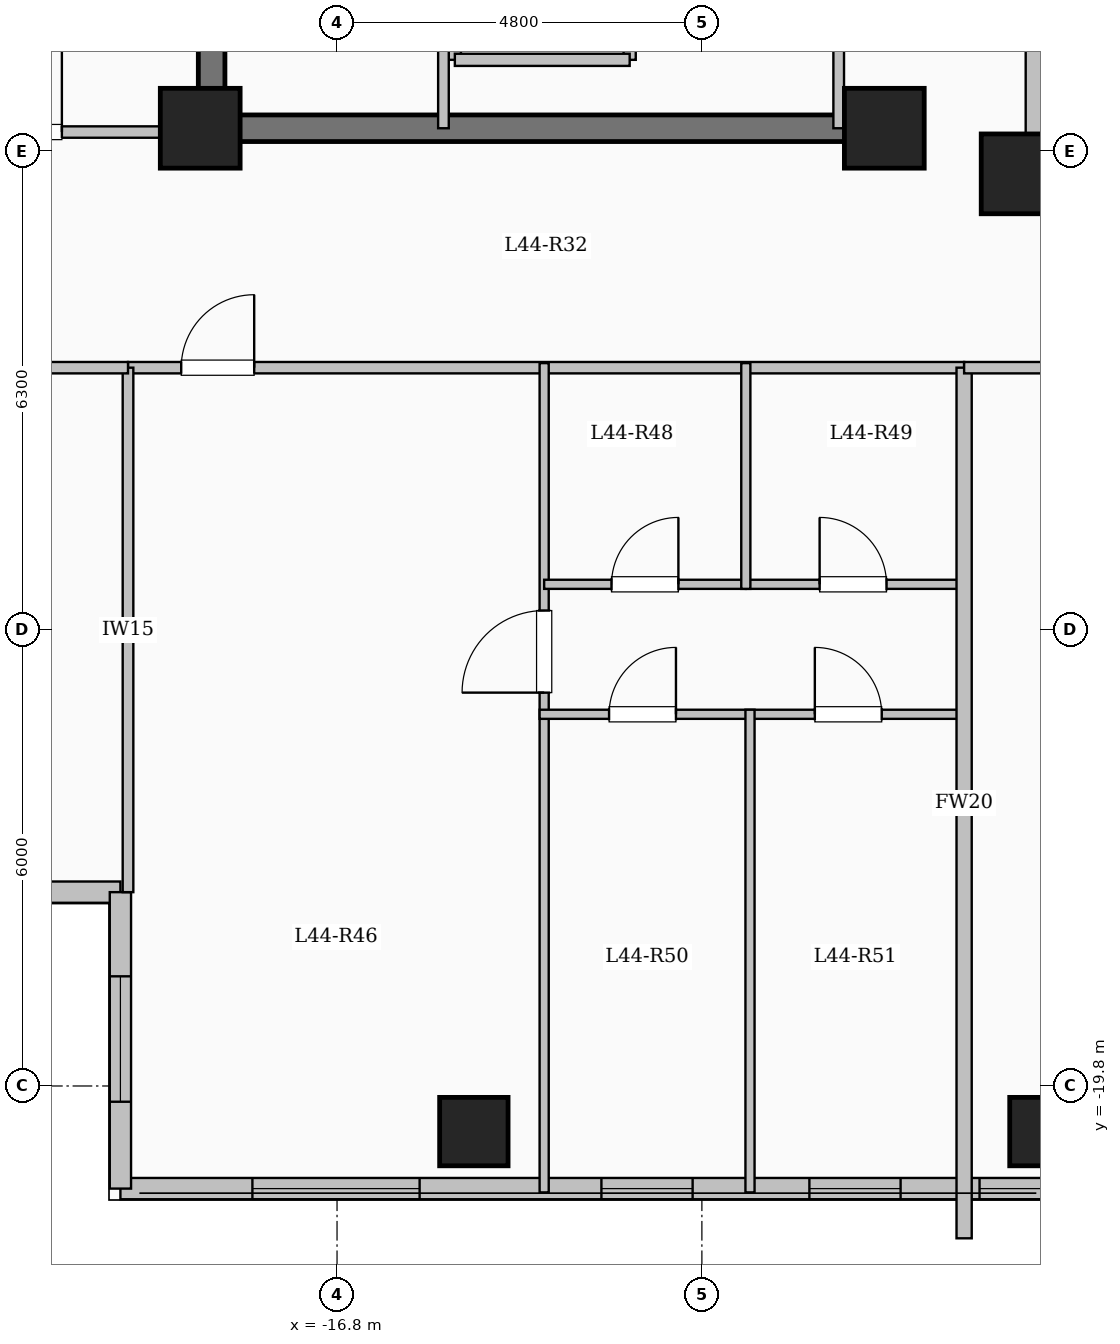
"""IFC4 building model, lengths in metres.
Left out: names, types, materials, properties, quantities, classifications, styles, units other than length and angle.
Written with IfcOpenShell. Run it as: python <this file> out.ifc"""

import sys

from ifc_helpers import new_model, si_unit, direction, frame, frame_2d, origin, origin_2d, place, context, subcontext, project, spatial, rectangle, extrude, element, fill, save


model = new_model("IFC4")
c1 = context("Model", 3, precision=1e-05, world=origin(), true_north=direction((0.0, 1.0)))
c2 = subcontext(c1, "Body", "Model", "MODEL_VIEW")
j1 = project(units=[si_unit("LENGTHUNIT", "METRE"), si_unit("PLANEANGLEUNIT", "RADIAN")], contexts=[c1])
p1 = place(None, origin())
s1 = spatial("IfcSite", under=j1, at=p1, CompositionType="ELEMENT")
p2 = place(p1, origin())
s2 = spatial("IfcBuilding", under=s1, at=p2, CompositionType="ELEMENT")
p3 = place(p2, frame((0.0, 0.0, 162.75)))
s3 = spatial("IfcBuildingStorey", under=s2, at=p3, CompositionType="ELEMENT", Elevation=162.75)
for number, where, z_axis, x_axis in (
    (1, (-7.8, -7.8, 0.0), (0.0, 0.0, 1.0), (1.0, 0.0, 0.0)),
    (2, (-9.6, -7.2, 0.0), (0.0, 0.0, 1.0), (1.0, 0.0, 0.0)),
    (3, (-18.6, -7.2, 0.0), (0.0, 0.0, 1.0), (1.0, 0.0, 0.0)),
):
    element("IfcColumn", number, at=place(p3, frame(where, z_axis=z_axis, x_axis=x_axis)), inside=s3, PredefinedType="COLUMN", context=c2, shape_type="SweptSolid", body=[
        extrude(rectangle(XDim=1.05, YDim=1.05, at=origin_2d()), origin(), (0.0, 0.0, 1.0), 3.35),
    ])
for number, where, z_axis, x_axis in (
    (4, (-15.0, -20.4, 0.0), (0.0, 0.0, 1.0), (1.0, 0.0, 0.0)),
    (5, (-7.5, -20.4, 0.0), (0.0, 0.0, 1.0), (1.0, 0.0, 0.0)),
):
    element("IfcColumn", number, at=place(p3, frame(where, z_axis=z_axis, x_axis=x_axis)), inside=s3, PredefinedType="COLUMN", context=c2, shape_type="SweptSolid", body=[
        extrude(rectangle(XDim=0.9, YDim=0.9, at=origin_2d()), origin(), (0.0, 0.0, 1.0), 3.35),
    ])
p4 = place(p3, frame((-7.62, -7.62, 0.0), z_axis=(0.0, 0.0, 1.0), x_axis=(1.0, 0.0, 0.0)))
e6 = element("IfcWall", 6, at=p4, inside=s3, PredefinedType="SOLIDWALL", context=c2, shape_type="SweptSolid", body=[
    extrude(rectangle(XDim=15.24, YDim=0.24, at=frame_2d((7.62, 0.0))), origin(), (0.0, 0.0, 1.0), 3.1),
])
p5 = place(p4, frame((6.92, 0.0, 0.95)))
e7 = element("IfcOpeningElement", 7, at=p5, cuts=e6, PredefinedType="OPENING", context=c2, shape_type="SweptSolid", body=[
    extrude(rectangle(XDim=1.4, YDim=1.5, at=frame_2d((0.7, 0.75))), frame((0.0, 0.13, 0.0), z_axis=(0.0, -1.0, 0.0), x_axis=(1.0, 0.0, 0.0)), (0.0, 0.0, 1.0), 0.26),
])
p6 = place(p3, frame((-7.62, 7.62, 0.0), z_axis=(0.0, 0.0, 1.0), x_axis=(0.0, -1.0, 0.0)))
e8 = element("IfcWall", 8, at=p6, inside=s3, PredefinedType="SOLIDWALL", context=c2, shape_type="SweptSolid", body=[
    extrude(rectangle(XDim=15.24, YDim=0.24, at=frame_2d((7.62, 0.0))), origin(), (0.0, 0.0, 1.0), 3.1),
])
p7 = place(p6, frame((6.92, 0.0, 0.95)))
e9 = element("IfcOpeningElement", 9, at=p7, cuts=e8, PredefinedType="OPENING", context=c2, shape_type="SweptSolid", body=[
    extrude(rectangle(XDim=1.4, YDim=1.5, at=frame_2d((0.7, 0.75))), frame((0.0, 0.13, 0.0), z_axis=(0.0, -1.0, 0.0), x_axis=(1.0, 0.0, 0.0)), (0.0, 0.0, 1.0), 0.26),
])
p8 = place(p3, frame((-19.65, -17.25, 0.0), z_axis=(0.0, 0.0, 1.0), x_axis=(-1.0, 0.0, 0.0)))
e10 = element("IfcWall", 10, at=p8, inside=s3, PredefinedType="SOLIDWALL", context=c2, shape_type="SweptSolid", body=[
    extrude(rectangle(XDim=5.4, YDim=0.28, at=frame_2d((2.7, 0.0))), origin(), (0.0, 0.0, 1.0), 3.1),
])
p9 = place(p8, frame((1.575, 0.0, 0.9)))
e11 = element("IfcOpeningElement", 11, at=p9, cuts=e10, PredefinedType="OPENING", context=c2, shape_type="SweptSolid", body=[
    extrude(rectangle(XDim=2.2, YDim=1.75, at=frame_2d((1.1, 0.875))), frame((0.0, 0.15, 0.0), z_axis=(0.0, -1.0, 0.0), x_axis=(1.0, 0.0, 0.0)), (0.0, 0.0, 1.0), 0.3),
])
p10 = place(p3, frame((-7.35, -21.15, 0.0), z_axis=(0.0, 0.0, 1.0), x_axis=(-1.0, 0.0, 0.0)))
e12 = element("IfcWall", 12, at=p10, inside=s3, PredefinedType="SOLIDWALL", context=c2, shape_type="SweptSolid", body=[
    extrude(rectangle(XDim=12.3, YDim=0.28, at=frame_2d((6.15, 0.0))), origin(), (0.0, 0.0, 1.0), 3.1),
])
p11 = place(p10, frame((0.147, 0.0, 0.95)))
e13 = element("IfcOpeningElement", 13, at=p11, cuts=e12, PredefinedType="OPENING", context=c2, shape_type="SweptSolid", body=[
    extrude(rectangle(XDim=0.85, YDim=1.5, at=frame_2d((0.425, 0.75))), frame((0.0, 0.15, 0.0), z_axis=(0.0, -1.0, 0.0), x_axis=(1.0, 0.0, 0.0)), (0.0, 0.0, 1.0), 0.3),
])
p12 = place(p10, frame((2.036, 0.0, 0.95)))
e14 = element("IfcOpeningElement", 14, at=p12, cuts=e12, PredefinedType="OPENING", context=c2, shape_type="SweptSolid", body=[
    extrude(rectangle(XDim=1.2, YDim=1.5, at=frame_2d((0.6, 0.75))), frame((0.0, 0.15, 0.0), z_axis=(0.0, -1.0, 0.0), x_axis=(1.0, 0.0, 0.0)), (0.0, 0.0, 1.0), 0.3),
])
p13 = place(p10, frame((4.772, 0.0, 0.95)))
e15 = element("IfcOpeningElement", 15, at=p13, cuts=e12, PredefinedType="OPENING", context=c2, shape_type="SweptSolid", body=[
    extrude(rectangle(XDim=1.2, YDim=1.5, at=frame_2d((0.6, 0.75))), frame((0.0, 0.15, 0.0), z_axis=(0.0, -1.0, 0.0), x_axis=(1.0, 0.0, 0.0)), (0.0, 0.0, 1.0), 0.3),
])
p14 = place(p10, frame((8.364, 0.0, 0.9)))
e16 = element("IfcOpeningElement", 16, at=p14, cuts=e12, PredefinedType="OPENING", context=c2, shape_type="SweptSolid", body=[
    extrude(rectangle(XDim=2.2, YDim=1.75, at=frame_2d((1.1, 0.875))), frame((0.0, 0.15, 0.0), z_axis=(0.0, -1.0, 0.0), x_axis=(1.0, 0.0, 0.0)), (0.0, 0.0, 1.0), 0.3),
])
p15 = place(p3, frame((-19.65, -21.15, 0.0), z_axis=(0.0, 0.0, 1.0), x_axis=(0.0, 1.0, 0.0)))
e17 = element("IfcWall", 17, at=p15, inside=s3, PredefinedType="SOLIDWALL", context=c2, shape_type="SweptSolid", body=[
    extrude(rectangle(XDim=3.9, YDim=0.28, at=frame_2d((1.95, 0.0))), origin(), (0.0, 0.0, 1.0), 3.1),
])
p16 = place(p15, frame((1.143, 0.0, 0.9)))
e18 = element("IfcOpeningElement", 18, at=p16, cuts=e17, PredefinedType="OPENING", context=c2, shape_type="SweptSolid", body=[
    extrude(rectangle(XDim=1.65, YDim=1.6, at=frame_2d((0.825, 0.8))), frame((0.0, 0.15, 0.0), z_axis=(0.0, -1.0, 0.0), x_axis=(1.0, 0.0, 0.0)), (0.0, 0.0, 1.0), 0.3),
])
for number, where, z_axis, x_axis in (
    (19, (-15.25, -6.3, 0.0), (0.0, 0.0, 1.0), (0.0, 1.0, 0.0)),
    (20, (-12.95, -6.3, 0.0), (0.0, 0.0, 1.0), (0.0, 1.0, 0.0)),
):
    element("IfcWall", number, at=place(p3, frame(where, z_axis=z_axis, x_axis=x_axis)), inside=s3, PredefinedType="SOLIDWALL", context=c2, shape_type="SweptSolid", body=[
        extrude(rectangle(XDim=2.6, YDim=0.16, at=frame_2d((1.3, 0.0))), origin(), (0.0, 0.0, 1.0), 3.1),
    ])
p17 = place(p3, frame((-15.25, -6.3, 0.0), z_axis=(0.0, 0.0, 1.0), x_axis=(1.0, 0.0, 0.0)))
e21 = element("IfcWall", 21, at=p17, inside=s3, PredefinedType="SOLIDWALL", context=c2, shape_type="SweptSolid", body=[
    extrude(rectangle(XDim=2.3, YDim=0.16, at=frame_2d((1.15, 0.0))), origin(), (0.0, 0.0, 1.0), 3.1),
])
p18 = place(p3, frame((-18.45, -7.375, 0.0), z_axis=(0.0, 0.0, 1.0), x_axis=(0.0, 1.0, 0.0)))
e22 = element("IfcWall", 22, at=p18, inside=s3, PredefinedType="SHEAR", context=c2, shape_type="SweptSolid", body=[
    extrude(rectangle(XDim=14.05, YDim=0.35, at=frame_2d((7.025, 0.0))), origin(), (0.0, 0.0, 1.0), 3.35),
])
p19 = place(p3, frame((-18.625, -7.2, 0.0), z_axis=(0.0, 0.0, 1.0), x_axis=(1.0, 0.0, 0.0)))
e23 = element("IfcWall", 23, at=p19, inside=s3, PredefinedType="SHEAR", context=c2, shape_type="SweptSolid", body=[
    extrude(rectangle(XDim=8.55, YDim=0.35, at=frame_2d((4.275, 0.0))), origin(), (0.0, 0.0, 1.0), 3.35),
])
p20 = place(p3, frame((-15.4, -7.2, 0.0), z_axis=(0.0, 0.0, 1.0), x_axis=(0.0, 1.0, 0.0)))
e24 = element("IfcWall", 24, at=p20, inside=s3, PredefinedType="PARTITIONING", context=c2, shape_type="SweptSolid", body=[
    extrude(rectangle(XDim=10.45, YDim=0.14, at=frame_2d((5.225, 0.0))), origin(), (0.0, 0.0, 1.0), 3.1),
])
p21 = place(p20, frame((9.25, 0.0, 0.0)))
e25 = element("IfcOpeningElement", 25, at=p21, cuts=e24, PredefinedType="OPENING", context=c2, shape_type="SweptSolid", body=[
    extrude(rectangle(XDim=0.9, YDim=2.08, at=frame_2d((0.45, 1.04))), frame((0.0, 0.08, 0.0), z_axis=(0.0, -1.0, 0.0), x_axis=(1.0, 0.0, 0.0)), (0.0, 0.0, 1.0), 0.16),
])
p22 = place(p3, frame((-10.2, -7.2, 0.0), z_axis=(0.0, 0.0, 1.0), x_axis=(0.0, 1.0, 0.0)))
e26 = element("IfcWall", 26, at=p22, inside=s3, PredefinedType="PARTITIONING", context=c2, shape_type="SweptSolid", body=[
    extrude(rectangle(XDim=9.12, YDim=0.14, at=frame_2d((4.56, 0.0))), origin(), (0.0, 0.0, 1.0), 3.1),
])
p23 = place(p22, frame((1.9, 0.0, 0.0)))
e27 = element("IfcOpeningElement", 27, at=p23, cuts=e26, PredefinedType="OPENING", context=c2, shape_type="SweptSolid", body=[
    extrude(rectangle(XDim=0.95, YDim=2.12, at=frame_2d((0.475, 1.06))), frame((0.0, 0.08, 0.0), z_axis=(0.0, -1.0, 0.0), x_axis=(1.0, 0.0, 0.0)), (0.0, 0.0, 1.0), 0.16),
])
p24 = place(p22, frame((7.75, 0.0, 0.0)))
e28 = element("IfcOpeningElement", 28, at=p24, cuts=e26, PredefinedType="OPENING", context=c2, shape_type="SweptSolid", body=[
    extrude(rectangle(XDim=0.95, YDim=2.12, at=frame_2d((0.475, 1.06))), frame((0.0, 0.08, 0.0), z_axis=(0.0, -1.0, 0.0), x_axis=(1.0, 0.0, 0.0)), (0.0, 0.0, 1.0), 0.16),
])
p25 = place(p3, frame((-19.55, -10.35, 0.0), z_axis=(0.0, 0.0, 1.0), x_axis=(1.0, 0.0, 0.0)))
e29 = element("IfcWall", 29, at=p25, inside=s3, PredefinedType="PARTITIONING", context=c2, shape_type="SweptSolid", body=[
    extrude(rectangle(XDim=11.0, YDim=0.15, at=frame_2d((5.5, 0.0))), origin(), (0.0, 0.0, 1.0), 3.1),
])
p26 = place(p25, frame((0.7, 0.0, 0.0)))
e30 = element("IfcOpeningElement", 30, at=p26, cuts=e29, PredefinedType="OPENING", context=c2, shape_type="SweptSolid", body=[
    extrude(rectangle(XDim=0.96, YDim=2.15, at=frame_2d((0.48, 1.075))), frame((0.0, 0.085, 0.0), z_axis=(0.0, -1.0, 0.0), x_axis=(1.0, 0.0, 0.0)), (0.0, 0.0, 1.0), 0.17),
])
p27 = place(p3, frame((-14.075, -21.2, 0.0), z_axis=(0.0, 0.0, 1.0), x_axis=(0.0, 1.0, 0.0)))
e31 = element("IfcWall", 31, at=p27, inside=s3, PredefinedType="PARTITIONING", context=c2, shape_type="SweptSolid", body=[
    extrude(rectangle(XDim=10.91, YDim=0.12, at=frame_2d((5.455, 0.0))), origin(), (0.0, 0.0, 1.0), 3.1),
])
p28 = place(p27, frame((6.575, 0.0, 0.0)))
e32 = element("IfcOpeningElement", 32, at=p28, cuts=e31, PredefinedType="OPENING", context=c2, shape_type="SweptSolid", body=[
    extrude(rectangle(XDim=1.08, YDim=2.15, at=frame_2d((0.54, 1.075))), frame((0.0, 0.07, 0.0), z_axis=(0.0, -1.0, 0.0), x_axis=(1.0, 0.0, 0.0)), (0.0, 0.0, 1.0), 0.14),
])
p29 = place(p3, frame((-14.075, -13.2, 0.0), z_axis=(0.0, 0.0, 1.0), x_axis=(1.0, 0.0, 0.0)))
e33 = element("IfcWall", 33, at=p29, inside=s3, PredefinedType="PARTITIONING", context=c2, shape_type="SweptSolid", body=[
    extrude(rectangle(XDim=2.653, YDim=0.12, at=frame_2d((1.326, 0.0))), origin(), (0.0, 0.0, 1.0), 3.1),
])
p30 = place(p29, frame((0.886, 0.0, 0.0)))
e34 = element("IfcOpeningElement", 34, at=p30, cuts=e33, PredefinedType="OPENING", context=c2, shape_type="SweptSolid", body=[
    extrude(rectangle(XDim=0.88, YDim=2.1, at=frame_2d((0.44, 1.05))), frame((0.0, 0.07, 0.0), z_axis=(0.0, -1.0, 0.0), x_axis=(1.0, 0.0, 0.0)), (0.0, 0.0, 1.0), 0.14),
])
p31 = place(p3, frame((-11.422, -13.2, 0.0), z_axis=(0.0, 0.0, 1.0), x_axis=(1.0, 0.0, 0.0)))
e35 = element("IfcWall", 35, at=p31, inside=s3, PredefinedType="PARTITIONING", context=c2, shape_type="SweptSolid", body=[
    extrude(rectangle(XDim=2.822, YDim=0.12, at=frame_2d((1.411, 0.0))), origin(), (0.0, 0.0, 1.0), 3.1),
])
p32 = place(p31, frame((0.971, 0.0, 0.0)))
e36 = element("IfcOpeningElement", 36, at=p32, cuts=e35, PredefinedType="OPENING", context=c2, shape_type="SweptSolid", body=[
    extrude(rectangle(XDim=0.88, YDim=2.1, at=frame_2d((0.44, 1.05))), frame((0.0, 0.07, 0.0), z_axis=(0.0, -1.0, 0.0), x_axis=(1.0, 0.0, 0.0)), (0.0, 0.0, 1.0), 0.14),
])
p33 = place(p3, frame((-14.135, -14.91, 0.0), z_axis=(0.0, 0.0, 1.0), x_axis=(1.0, 0.0, 0.0)))
e37 = element("IfcWall", 37, at=p33, inside=s3, PredefinedType="PARTITIONING", context=c2, shape_type="SweptSolid", body=[
    extrude(rectangle(XDim=5.595, YDim=0.12, at=frame_2d((2.797, 0.0))), origin(), (0.0, 0.0, 1.0), 3.1),
])
p34 = place(p33, frame((0.914, 0.0, 0.0)))
e38 = element("IfcOpeningElement", 38, at=p34, cuts=e37, PredefinedType="OPENING", context=c2, shape_type="SweptSolid", body=[
    extrude(rectangle(XDim=0.88, YDim=2.1, at=frame_2d((0.44, 1.05))), frame((0.0, 0.07, 0.0), z_axis=(0.0, -1.0, 0.0), x_axis=(1.0, 0.0, 0.0)), (0.0, 0.0, 1.0), 0.14),
])
p35 = place(p33, frame((3.621, 0.0, 0.0)))
e39 = element("IfcOpeningElement", 39, at=p35, cuts=e37, PredefinedType="OPENING", context=c2, shape_type="SweptSolid", body=[
    extrude(rectangle(XDim=0.88, YDim=2.1, at=frame_2d((0.44, 1.05))), frame((0.0, 0.07, 0.0), z_axis=(0.0, -1.0, 0.0), x_axis=(1.0, 0.0, 0.0)), (0.0, 0.0, 1.0), 0.14),
])
p36 = place(p3, frame((-11.422, -13.26, 0.0), z_axis=(0.0, 0.0, 1.0), x_axis=(0.0, 1.0, 0.0)))
e40 = element("IfcWall", 40, at=p36, inside=s3, PredefinedType="PARTITIONING", context=c2, shape_type="SweptSolid", body=[
    extrude(rectangle(XDim=2.97, YDim=0.12, at=frame_2d((1.485, 0.0))), origin(), (0.0, 0.0, 1.0), 3.1),
])
p37 = place(p3, frame((-11.367, -21.2, 0.0), z_axis=(0.0, 0.0, 1.0), x_axis=(0.0, 1.0, 0.0)))
e41 = element("IfcWall", 41, at=p37, inside=s3, PredefinedType="PARTITIONING", context=c2, shape_type="SweptSolid", body=[
    extrude(rectangle(XDim=6.35, YDim=0.12, at=frame_2d((3.175, 0.0))), origin(), (0.0, 0.0, 1.0), 3.1),
])
p38 = place(p3, frame((-8.55, -21.804, 0.0), z_axis=(0.0, 0.0, 1.0), x_axis=(0.0, 1.0, 0.0)))
e42 = element("IfcWall", 42, at=p38, inside=s3, PredefinedType="SOLIDWALL", context=c2, shape_type="SweptSolid", body=[
    extrude(rectangle(XDim=11.454, YDim=0.2, at=frame_2d((5.727, 0.0))), origin(), (0.0, 0.0, 1.0), 3.1),
])
p39 = place(p3, frame((-8.55, -10.35, 0.0), z_axis=(0.0, 0.0, 1.0), x_axis=(1.0, 0.0, 0.0)))
e43 = element("IfcWall", 43, at=p39, inside=s3, PredefinedType="PARTITIONING", context=c2, shape_type="SweptSolid", body=[
    extrude(rectangle(XDim=17.1, YDim=0.15, at=frame_2d((8.55, 0.0))), origin(), (0.0, 0.0, 1.0), 3.1),
])
p40 = place(p39, frame((1.6, 0.0, 0.0)))
e44 = element("IfcOpeningElement", 44, at=p40, cuts=e43, PredefinedType="OPENING", context=c2, shape_type="SweptSolid", body=[
    extrude(rectangle(XDim=0.96, YDim=2.15, at=frame_2d((0.48, 1.075))), frame((0.0, 0.085, 0.0), z_axis=(0.0, -1.0, 0.0), x_axis=(1.0, 0.0, 0.0)), (0.0, 0.0, 1.0), 0.17),
])
p41 = place(p3, frame((-25.08, -7.25, 0.0), z_axis=(0.0, 0.0, 1.0), x_axis=(1.0, 0.0, 0.0)))
e45 = element("IfcWall", 45, at=p41, inside=s3, PredefinedType="PARTITIONING", context=c2, shape_type="SweptSolid", body=[
    extrude(rectangle(XDim=6.63, YDim=0.15, at=frame_2d((3.315, 0.0))), origin(), (0.0, 0.0, 1.0), 3.1),
])
p42 = place(p41, frame((3.58, 0.0, 0.0)))
e46 = element("IfcOpeningElement", 46, at=p42, cuts=e45, PredefinedType="OPENING", context=c2, shape_type="SweptSolid", body=[
    extrude(rectangle(XDim=1.08, YDim=2.15, at=frame_2d((0.54, 1.075))), frame((0.0, 0.085, 0.0), z_axis=(0.0, -1.0, 0.0), x_axis=(1.0, 0.0, 0.0)), (0.0, 0.0, 1.0), 0.17),
])
p43 = place(p3, frame((-19.55, -17.25, 0.0), z_axis=(0.0, 0.0, 1.0), x_axis=(0.0, 1.0, 0.0)))
e47 = element("IfcWall", 47, at=p43, inside=s3, PredefinedType="PARTITIONING", context=c2, shape_type="SweptSolid", body=[
    extrude(rectangle(XDim=6.9, YDim=0.14, at=frame_2d((3.45, 0.0))), origin(), (0.0, 0.0, 1.0), 3.1),
])
p44 = place(p3, frame((-25.08, -10.35, 0.0), z_axis=(0.0, 0.0, 1.0), x_axis=(1.0, 0.0, 0.0)))
e48 = element("IfcWall", 48, at=p44, inside=s3, PredefinedType="PARTITIONING", context=c2, shape_type="SweptSolid", body=[
    extrude(rectangle(XDim=5.53, YDim=0.15, at=frame_2d((2.765, 0.0))), origin(), (0.0, 0.0, 1.0), 3.1),
])
p45 = place(p44, frame((2.29, 0.0, 0.0)))
e49 = element("IfcOpeningElement", 49, at=p45, cuts=e48, PredefinedType="OPENING", context=c2, shape_type="SweptSolid", body=[
    extrude(rectangle(XDim=0.95, YDim=2.15, at=frame_2d((0.475, 1.075))), frame((0.0, 0.085, 0.0), z_axis=(0.0, -1.0, 0.0), x_axis=(1.0, 0.0, 0.0)), (0.0, 0.0, 1.0), 0.17),
])
p46 = place(p11, origin())
e50 = element("IfcWindow", 50, at=p46, inside=s3, PartitioningType="SINGLE_PANEL", PredefinedType="WINDOW", context=c2, shape_type="SweptSolid", body=[
    extrude(rectangle(XDim=0.85, YDim=1.5, at=frame_2d((0.425, 0.75))), frame((0.0, 0.03, 0.0), z_axis=(0.0, -1.0, 0.0), x_axis=(1.0, 0.0, 0.0)), (0.0, 0.0, 1.0), 0.06),
])
fill(e13, e50)
p47 = place(p12, origin())
e51 = element("IfcWindow", 51, at=p47, inside=s3, PartitioningType="SINGLE_PANEL", PredefinedType="WINDOW", context=c2, shape_type="SweptSolid", body=[
    extrude(rectangle(XDim=1.2, YDim=1.5, at=frame_2d((0.6, 0.75))), frame((0.0, 0.03, 0.0), z_axis=(0.0, -1.0, 0.0), x_axis=(1.0, 0.0, 0.0)), (0.0, 0.0, 1.0), 0.06),
])
fill(e14, e51)
p48 = place(p13, origin())
e52 = element("IfcWindow", 52, at=p48, inside=s3, PartitioningType="SINGLE_PANEL", PredefinedType="WINDOW", context=c2, shape_type="SweptSolid", body=[
    extrude(rectangle(XDim=1.2, YDim=1.5, at=frame_2d((0.6, 0.75))), frame((0.0, 0.03, 0.0), z_axis=(0.0, -1.0, 0.0), x_axis=(1.0, 0.0, 0.0)), (0.0, 0.0, 1.0), 0.06),
])
fill(e15, e52)
p49 = place(p14, origin())
e53 = element("IfcWindow", 53, at=p49, inside=s3, PartitioningType="SINGLE_PANEL", PredefinedType="WINDOW", context=c2, shape_type="SweptSolid", body=[
    extrude(rectangle(XDim=2.2, YDim=1.75, at=frame_2d((1.1, 0.875))), frame((0.0, 0.03, 0.0), z_axis=(0.0, -1.0, 0.0), x_axis=(1.0, 0.0, 0.0)), (0.0, 0.0, 1.0), 0.06),
])
fill(e16, e53)
p50 = place(p16, origin())
e54 = element("IfcWindow", 54, at=p50, inside=s3, PartitioningType="SINGLE_PANEL", PredefinedType="WINDOW", context=c2, shape_type="SweptSolid", body=[
    extrude(rectangle(XDim=1.65, YDim=1.6, at=frame_2d((0.825, 0.8))), frame((0.0, 0.03, 0.0), z_axis=(0.0, -1.0, 0.0), x_axis=(1.0, 0.0, 0.0)), (0.0, 0.0, 1.0), 0.06),
])
fill(e18, e54)
p51 = place(p26, origin())
e55 = element("IfcDoor", 55, at=p51, inside=s3, OperationType="SINGLE_SWING_RIGHT", PredefinedType="DOOR", context=c2, shape_type="SweptSolid", body=[
    extrude(rectangle(XDim=0.96, YDim=2.15, at=frame_2d((0.48, 1.075))), frame((0.0, 0.025, 0.0), z_axis=(0.0, -1.0, 0.0), x_axis=(1.0, 0.0, 0.0)), (0.0, 0.0, 1.0), 0.05),
])
fill(e30, e55)
p52 = place(p28, origin())
e56 = element("IfcDoor", 56, at=p52, inside=s3, OperationType="SINGLE_SWING_LEFT", PredefinedType="DOOR", context=c2, shape_type="SweptSolid", body=[
    extrude(rectangle(XDim=1.08, YDim=2.15, at=frame_2d((0.54, 1.075))), frame((0.0, 0.025, 0.0), z_axis=(0.0, -1.0, 0.0), x_axis=(1.0, 0.0, 0.0)), (0.0, 0.0, 1.0), 0.05),
])
fill(e32, e56)
p53 = place(p30, origin())
e57 = element("IfcDoor", 57, at=p53, inside=s3, OperationType="SINGLE_SWING_RIGHT", PredefinedType="DOOR", context=c2, shape_type="SweptSolid", body=[
    extrude(rectangle(XDim=0.88, YDim=2.1, at=frame_2d((0.44, 1.05))), frame((0.0, 0.025, 0.0), z_axis=(0.0, -1.0, 0.0), x_axis=(1.0, 0.0, 0.0)), (0.0, 0.0, 1.0), 0.05),
])
fill(e34, e57)
p54 = place(p32, origin())
e58 = element("IfcDoor", 58, at=p54, inside=s3, OperationType="SINGLE_SWING_LEFT", PredefinedType="DOOR", context=c2, shape_type="SweptSolid", body=[
    extrude(rectangle(XDim=0.88, YDim=2.1, at=frame_2d((0.44, 1.05))), frame((0.0, 0.025, 0.0), z_axis=(0.0, -1.0, 0.0), x_axis=(1.0, 0.0, 0.0)), (0.0, 0.0, 1.0), 0.05),
])
fill(e36, e58)
p55 = place(p34, origin())
e59 = element("IfcDoor", 59, at=p55, inside=s3, OperationType="SINGLE_SWING_RIGHT", PredefinedType="DOOR", context=c2, shape_type="SweptSolid", body=[
    extrude(rectangle(XDim=0.88, YDim=2.1, at=frame_2d((0.44, 1.05))), frame((0.0, 0.025, 0.0), z_axis=(0.0, -1.0, 0.0), x_axis=(1.0, 0.0, 0.0)), (0.0, 0.0, 1.0), 0.05),
])
fill(e38, e59)
p56 = place(p35, origin())
e60 = element("IfcDoor", 60, at=p56, inside=s3, OperationType="SINGLE_SWING_LEFT", PredefinedType="DOOR", context=c2, shape_type="SweptSolid", body=[
    extrude(rectangle(XDim=0.88, YDim=2.1, at=frame_2d((0.44, 1.05))), frame((0.0, 0.025, 0.0), z_axis=(0.0, -1.0, 0.0), x_axis=(1.0, 0.0, 0.0)), (0.0, 0.0, 1.0), 0.05),
])
fill(e39, e60)
p57 = place(p42, origin())
e61 = element("IfcDoor", 61, at=p57, inside=s3, OperationType="SINGLE_SWING_RIGHT", PredefinedType="DOOR", context=c2, shape_type="SweptSolid", body=[
    extrude(rectangle(XDim=1.08, YDim=2.15, at=frame_2d((0.54, 1.075))), frame((0.0, 0.025, 0.0), z_axis=(0.0, -1.0, 0.0), x_axis=(1.0, 0.0, 0.0)), (0.0, 0.0, 1.0), 0.05),
])
fill(e46, e61)
save(model, sys.argv[1])
